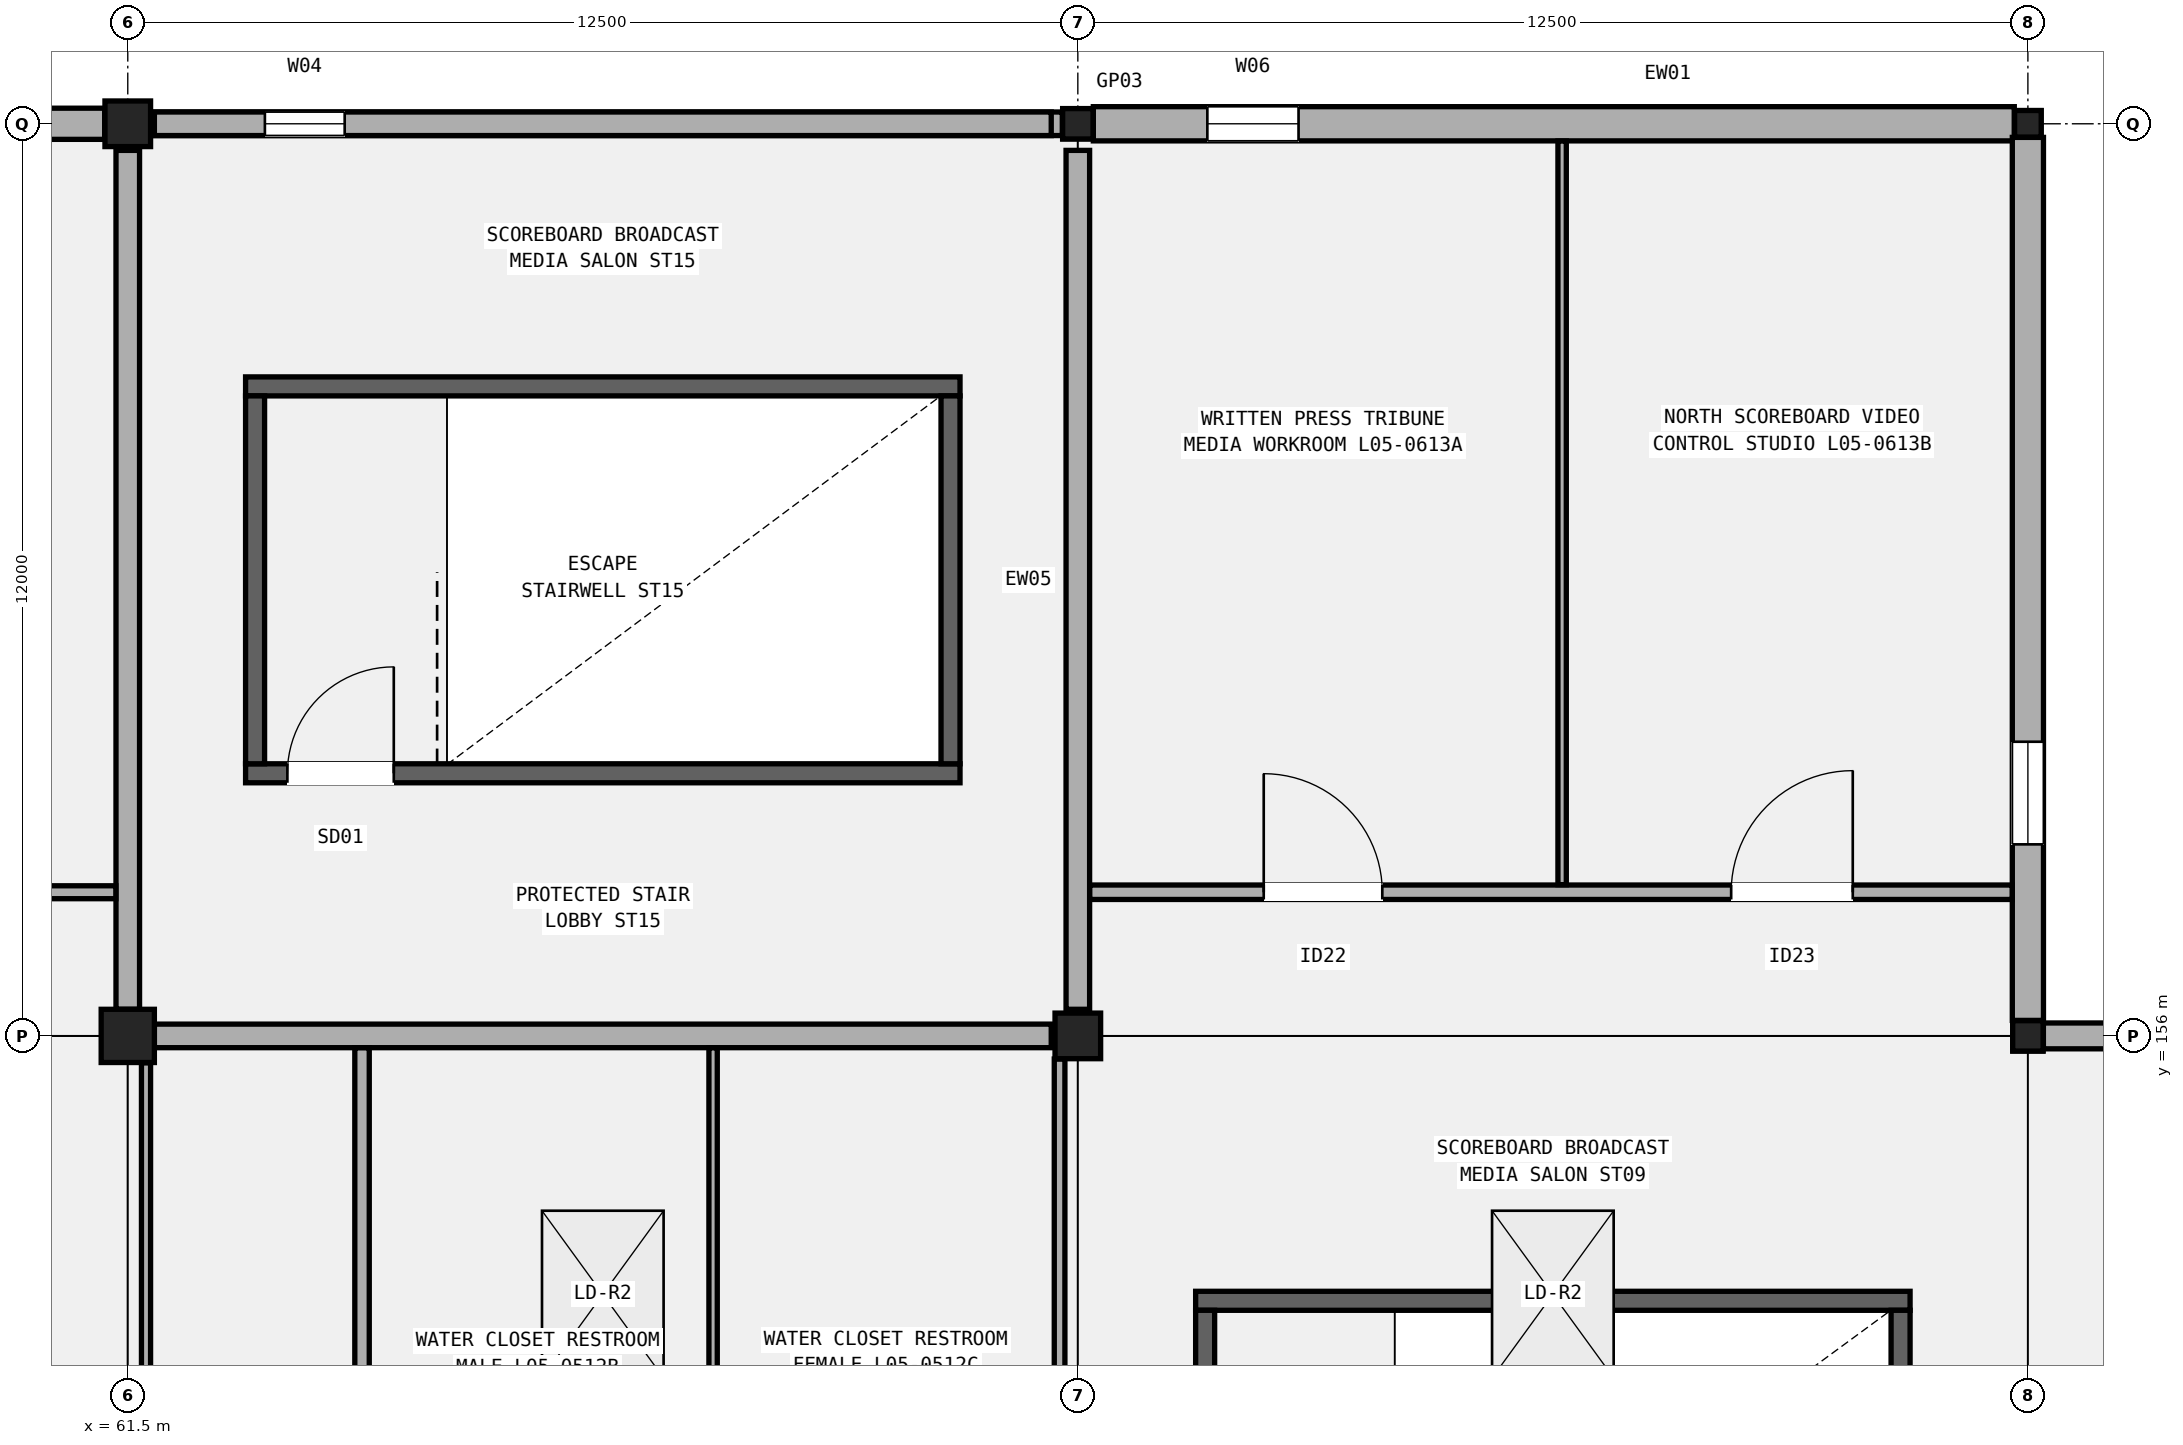
"""IFC4 building model, lengths in metres.
Left out: names, types, materials, properties, quantities, classifications, styles, units other than length and angle.
Written with IfcOpenShell. Run it as: python <this file> out.ifc"""

import sys

from ifc_helpers import new_model, si_unit, direction, frame, frame_2d, origin, origin_2d, place, context, subcontext, project, spatial, rectangle, hollow_rectangle, extrude, element, fill, save


model = new_model("IFC4")
c1 = context("Model", 3, precision=1e-05, world=origin(), true_north=direction((0.0, 1.0)))
c2 = subcontext(c1, "Body", "Model", "MODEL_VIEW")
j1 = project(units=[si_unit("LENGTHUNIT", "METRE"), si_unit("PLANEANGLEUNIT", "RADIAN")], contexts=[c1])
p1 = place(None, origin())
s1 = spatial("IfcSite", under=j1, at=p1, CompositionType="ELEMENT")
p2 = place(p1, origin())
s2 = spatial("IfcBuilding", under=s1, at=p2, CompositionType="ELEMENT")
p3 = place(p2, frame((0.0, 0.0, 25.8)))
s3 = spatial("IfcBuildingStorey", under=s2, at=p3, CompositionType="ELEMENT", Elevation=25.8)
p4 = place(p3, frame((61.5, 156.0, 0.0), z_axis=(0.0, 0.0, 1.0), x_axis=(1.0, 0.0, 0.0)))
e1 = element("IfcColumn", 1, at=p4, inside=s3, PredefinedType="COLUMN", context=c2, shape_type="SweptSolid", body=[
    extrude(rectangle(XDim=0.7, YDim=0.7, at=origin_2d()), origin(), (0.0, 0.0, 1.0), 5.4),
])
for number, where, z_axis, x_axis in (
    (2, (61.5, 168.0, 0.0), (0.0, 0.0, 1.0), (1.0, 0.0, 0.0)),
    (3, (74.0, 156.0, 0.0), (0.0, 0.0, 1.0), (1.0, 0.0, 0.0)),
):
    element("IfcColumn", number, at=place(p3, frame(where, z_axis=z_axis, x_axis=x_axis)), inside=s3, PredefinedType="COLUMN", context=c2, shape_type="SweptSolid", body=[
        extrude(rectangle(XDim=0.6, YDim=0.6, at=origin_2d()), origin(), (0.0, 0.0, 1.0), 5.4),
    ])
for number, where, z_axis, x_axis in (
    (4, (74.0, 168.0, 0.0), (0.0, 0.0, 1.0), (1.0, 0.0, 0.0)),
    (5, (86.5, 156.0, 0.0), (0.0, 0.0, 1.0), (1.0, 0.0, 0.0)),
):
    element("IfcColumn", number, at=place(p3, frame(where, z_axis=z_axis, x_axis=x_axis)), inside=s3, PredefinedType="COLUMN", context=c2, shape_type="SweptSolid", body=[
        extrude(hollow_rectangle(XDim=0.4, YDim=0.4, WallThickness=0.016, InnerFilletRadius=0.016, OuterFilletRadius=0.032, at=origin_2d()), origin(), (0.0, 0.0, 1.0), 5.4),
    ])
p5 = place(p3, frame((86.5, 168.0, 0.0), z_axis=(0.0, 0.0, 1.0), x_axis=(1.0, 0.0, 0.0)))
e6 = element("IfcColumn", 6, at=p5, inside=s3, PredefinedType="COLUMN", context=c2, shape_type="SweptSolid", body=[
    extrude(hollow_rectangle(XDim=0.35, YDim=0.35, WallThickness=0.016, InnerFilletRadius=0.016, OuterFilletRadius=0.032, at=origin_2d()), origin(), (0.0, 0.0, 1.0), 5.4),
])
p6 = place(p3, frame((49.354, 168.0, 0.0), z_axis=(0.0, 0.0, 1.0), x_axis=(1.0, 0.0, 0.0)))
e7 = element("IfcWall", 7, at=p6, inside=s3, PredefinedType="SOLIDWALL", context=c2, shape_type="SweptSolid", body=[
    extrude(rectangle(XDim=11.842, YDim=0.41, at=frame_2d((5.921, 0.0))), origin(), (0.0, 0.0, 1.0), 4.34),
])
p7 = place(p6, frame((6.039, 0.0, 0.95)))
e8 = element("IfcOpeningElement", 8, at=p7, cuts=e7, PredefinedType="OPENING", context=c2, shape_type="SweptSolid", body=[
    extrude(rectangle(XDim=0.9, YDim=2.1, at=frame_2d((0.45, 1.05))), frame((0.0, 0.215, 0.0), z_axis=(0.0, -1.0, 0.0), x_axis=(1.0, 0.0, 0.0)), (0.0, 0.0, 1.0), 0.43),
])
p8 = place(p3, frame((61.804, 168.0, 0.0), z_axis=(0.0, 0.0, 1.0), x_axis=(1.0, 0.0, 0.0)))
e9 = element("IfcWall", 9, at=p8, inside=s3, PredefinedType="SOLIDWALL", context=c2, shape_type="SweptSolid", body=[
    extrude(rectangle(XDim=11.992, YDim=0.31, at=frame_2d((5.996, 0.0))), origin(), (0.0, 0.0, 1.0), 4.44),
])
p9 = place(p8, frame((1.5, 0.0, 0.95)))
e10 = element("IfcOpeningElement", 10, at=p9, cuts=e9, PredefinedType="OPENING", context=c2, shape_type="SweptSolid", body=[
    extrude(rectangle(XDim=1.05, YDim=2.2, at=frame_2d((0.525, 1.1))), frame((0.0, 0.165, 0.0), z_axis=(0.0, -1.0, 0.0), x_axis=(1.0, 0.0, 0.0)), (0.0, 0.0, 1.0), 0.33),
])
p10 = place(p3, frame((74.204, 168.0, 0.0), z_axis=(0.0, 0.0, 1.0), x_axis=(1.0, 0.0, 0.0)))
e11 = element("IfcWall", 11, at=p10, inside=s3, PredefinedType="SOLIDWALL", context=c2, shape_type="SweptSolid", body=[
    extrude(rectangle(XDim=12.117, YDim=0.45, at=frame_2d((6.059, 0.0))), origin(), (0.0, 0.0, 1.0), 4.452),
])
p11 = place(p10, frame((1.5, 0.0, 0.95)))
e12 = element("IfcOpeningElement", 12, at=p11, cuts=e11, PredefinedType="OPENING", context=c2, shape_type="SweptSolid", body=[
    extrude(rectangle(XDim=1.2, YDim=2.3, at=frame_2d((0.6, 1.15))), frame((0.0, 0.235, 0.0), z_axis=(0.0, -1.0, 0.0), x_axis=(1.0, 0.0, 0.0)), (0.0, 0.0, 1.0), 0.47),
])
p12 = place(p3, frame((86.5, 156.204, 0.0), z_axis=(0.0, 0.0, 1.0), x_axis=(0.0, 1.0, 0.0)))
e13 = element("IfcWall", 13, at=p12, inside=s3, PredefinedType="SOLIDWALL", context=c2, shape_type="SweptSolid", body=[
    extrude(rectangle(XDim=11.617, YDim=0.41, at=frame_2d((5.809, 0.0))), origin(), (0.0, 0.0, 1.0), 4.452),
])
p13 = place(p12, frame((2.316, 0.0, 0.95)))
e14 = element("IfcOpeningElement", 14, at=p13, cuts=e13, PredefinedType="OPENING", context=c2, shape_type="SweptSolid", body=[
    extrude(rectangle(XDim=1.35, YDim=2.0, at=frame_2d((0.675, 1.0))), frame((0.0, 0.215, 0.0), z_axis=(0.0, -1.0, 0.0), x_axis=(1.0, 0.0, 0.0)), (0.0, 0.0, 1.0), 0.43),
])
p14 = place(p3, frame((86.704, 156.0, 0.0), z_axis=(0.0, 0.0, 1.0), x_axis=(1.0, 0.0, 0.0)))
e15 = element("IfcWall", 15, at=p14, inside=s3, PredefinedType="SOLIDWALL", context=c2, shape_type="SweptSolid", body=[
    extrude(rectangle(XDim=12.117, YDim=0.34, at=frame_2d((6.059, 0.0))), origin(), (0.0, 0.0, 1.0), 4.452),
])
p15 = place(p14, frame((1.5, 0.0, 0.95)))
e16 = element("IfcOpeningElement", 16, at=p15, cuts=e15, PredefinedType="OPENING", context=c2, shape_type="SweptSolid", body=[
    extrude(rectangle(XDim=1.5, YDim=1.8, at=frame_2d((0.75, 0.9))), frame((0.0, 0.18, 0.0), z_axis=(0.0, -1.0, 0.0), x_axis=(1.0, 0.0, 0.0)), (0.0, 0.0, 1.0), 0.36),
])
for number, where, z_axis, x_axis in (
    (17, (61.85, 156.0, 5.4), (0.0, 0.0, 1.0), (1.0, 0.0, 0.0)),
    (18, (61.85, 168.0, 5.4), (0.0, 0.0, 1.0), (1.0, 0.0, 0.0)),
):
    element("IfcWall", number, at=place(p3, frame(where, z_axis=z_axis, x_axis=x_axis)), inside=s3, PredefinedType="SOLIDWALL", context=c2, shape_type="SweptSolid", body=[
        extrude(rectangle(XDim=11.8, YDim=0.31, at=frame_2d((5.9, 0.0))), origin(), (0.0, 0.0, 1.0), 0.88),
    ])
for number, where, z_axis, x_axis in (
    (19, (61.5, 156.35, 5.4), (0.0, 0.0, 1.0), (0.0, 1.0, 0.0)),
    (20, (74.0, 156.35, 5.4), (0.0, 0.0, 1.0), (0.0, 1.0, 0.0)),
):
    element("IfcWall", number, at=place(p3, frame(where, z_axis=z_axis, x_axis=x_axis)), inside=s3, PredefinedType="SOLIDWALL", context=c2, shape_type="SweptSolid", body=[
        extrude(rectangle(XDim=11.3, YDim=0.31, at=frame_2d((5.65, 0.0))), origin(), (0.0, 0.0, 1.0), 0.48),
    ])
p16 = place(p3, frame((75.55, 152.515, 0.0), z_axis=(0.0, 0.0, 1.0), x_axis=(1.0, 0.0, 0.0)))
e21 = element("IfcWall", 21, at=p16, inside=s3, PredefinedType="SHEAR", context=c2, shape_type="SweptSolid", body=[
    extrude(rectangle(XDim=9.4, YDim=0.25, at=frame_2d((4.7, 0.0))), origin(), (0.0, 0.0, 1.0), 5.04),
])
for number, where, z_axis, x_axis in (
    (22, (75.675, 147.61, 0.0), (0.0, 0.0, 1.0), (0.0, 1.0, 0.0)),
    (23, (84.825, 147.61, 0.0), (0.0, 0.0, 1.0), (0.0, 1.0, 0.0)),
):
    element("IfcWall", number, at=place(p3, frame(where, z_axis=z_axis, x_axis=x_axis)), inside=s3, PredefinedType="SHEAR", context=c2, shape_type="SweptSolid", body=[
        extrude(rectangle(XDim=4.78, YDim=0.25, at=frame_2d((2.39, 0.0))), origin(), (0.0, 0.0, 1.0), 5.04),
    ])
p17 = place(p3, frame((63.05, 159.455, 0.0), z_axis=(0.0, 0.0, 1.0), x_axis=(1.0, 0.0, 0.0)))
e24 = element("IfcWall", 24, at=p17, inside=s3, PredefinedType="SHEAR", context=c2, shape_type="SweptSolid", body=[
    extrude(rectangle(XDim=9.4, YDim=0.25, at=frame_2d((4.7, 0.0))), origin(), (0.0, 0.0, 1.0), 5.04),
])
p18 = place(p17, frame((0.55, 0.0, 0.0)))
e25 = element("IfcOpeningElement", 25, at=p18, cuts=e24, PredefinedType="OPENING", context=c2, shape_type="SweptSolid", body=[
    extrude(rectangle(XDim=1.4, YDim=2.15, at=frame_2d((0.7, 1.075))), frame((0.0, 0.135, 0.0), z_axis=(0.0, -1.0, 0.0), x_axis=(1.0, 0.0, 0.0)), (0.0, 0.0, 1.0), 0.27),
])
p19 = place(p3, frame((63.05, 164.545, 0.0), z_axis=(0.0, 0.0, 1.0), x_axis=(1.0, 0.0, 0.0)))
e26 = element("IfcWall", 26, at=p19, inside=s3, PredefinedType="SHEAR", context=c2, shape_type="SweptSolid", body=[
    extrude(rectangle(XDim=9.4, YDim=0.25, at=frame_2d((4.7, 0.0))), origin(), (0.0, 0.0, 1.0), 5.04),
])
for number, where, z_axis, x_axis in (
    (27, (63.175, 159.58, 0.0), (0.0, 0.0, 1.0), (0.0, 1.0, 0.0)),
    (28, (72.325, 159.58, 0.0), (0.0, 0.0, 1.0), (0.0, 1.0, 0.0)),
):
    element("IfcWall", number, at=place(p3, frame(where, z_axis=z_axis, x_axis=x_axis)), inside=s3, PredefinedType="SHEAR", context=c2, shape_type="SweptSolid", body=[
        extrude(rectangle(XDim=4.84, YDim=0.25, at=frame_2d((2.42, 0.0))), origin(), (0.0, 0.0, 1.0), 5.04),
    ])
p20 = place(p3, frame((49.187, 157.89, 0.0), z_axis=(0.0, 0.0, 1.0), x_axis=(1.0, 0.0, 0.0)))
e29 = element("IfcWall", 29, at=p20, inside=s3, PredefinedType="PARTITIONING", context=c2, shape_type="SweptSolid", body=[
    extrude(rectangle(XDim=12.156, YDim=0.17, at=frame_2d((6.078, 0.0))), origin(), (0.0, 0.0, 1.0), 4.35),
])
p21 = place(p20, frame((2.054, 0.0, 0.0)))
e30 = element("IfcOpeningElement", 30, at=p21, cuts=e29, PredefinedType="OPENING", context=c2, shape_type="SweptSolid", body=[
    extrude(rectangle(XDim=1.36, YDim=2.25, at=frame_2d((0.68, 1.125))), frame((0.0, 0.095, 0.0), z_axis=(0.0, -1.0, 0.0), x_axis=(1.0, 0.0, 0.0)), (0.0, 0.0, 1.0), 0.19),
])
p22 = place(p20, frame((8.204, 0.0, 0.0)))
e31 = element("IfcOpeningElement", 31, at=p22, cuts=e29, PredefinedType="OPENING", context=c2, shape_type="SweptSolid", body=[
    extrude(rectangle(XDim=1.4, YDim=2.24, at=frame_2d((0.7, 1.12))), frame((0.0, 0.095, 0.0), z_axis=(0.0, -1.0, 0.0), x_axis=(1.0, 0.0, 0.0)), (0.0, 0.0, 1.0), 0.19),
])
p23 = place(p3, frame((61.74, 145.98, 0.0), z_axis=(0.0, 0.0, 1.0), x_axis=(0.0, 1.0, 0.0)))
e32 = element("IfcWall", 32, at=p23, inside=s3, PredefinedType="PARTITIONING", context=c2, shape_type="SweptSolid", body=[
    extrude(rectangle(XDim=9.666, YDim=0.12, at=frame_2d((4.833, 0.0))), origin(), (0.0, 0.0, 1.0), 4.35),
])
p24 = place(p3, frame((73.76, 145.98, 0.0), z_axis=(0.0, 0.0, 1.0), x_axis=(0.0, 1.0, 0.0)))
e33 = element("IfcWall", 33, at=p24, inside=s3, PredefinedType="PARTITIONING", context=c2, shape_type="SweptSolid", body=[
    extrude(rectangle(XDim=9.716, YDim=0.14, at=frame_2d((4.858, 0.0))), origin(), (0.0, 0.0, 1.0), 4.3),
])
p25 = place(p3, frame((64.582, 145.98, 0.0), z_axis=(0.0, 0.0, 1.0), x_axis=(0.0, 1.0, 0.0)))
e34 = element("IfcWall", 34, at=p25, inside=s3, PredefinedType="PARTITIONING", context=c2, shape_type="SweptSolid", body=[
    extrude(rectangle(XDim=9.863, YDim=0.19, at=frame_2d((4.932, 0.0))), origin(), (0.0, 0.0, 1.0), 4.35),
])
p26 = place(p3, frame((69.201, 145.98, 0.0), z_axis=(0.0, 0.0, 1.0), x_axis=(0.0, 1.0, 0.0)))
e35 = element("IfcWall", 35, at=p26, inside=s3, PredefinedType="PARTITIONING", context=c2, shape_type="SweptSolid", body=[
    extrude(rectangle(XDim=9.863, YDim=0.11, at=frame_2d((4.932, 0.0))), origin(), (0.0, 0.0, 1.0), 4.35),
])
p27 = place(p3, frame((74.157, 157.89, 0.0), z_axis=(0.0, 0.0, 1.0), x_axis=(1.0, 0.0, 0.0)))
e36 = element("IfcWall", 36, at=p27, inside=s3, PredefinedType="PARTITIONING", context=c2, shape_type="SweptSolid", body=[
    extrude(rectangle(XDim=12.136, YDim=0.19, at=frame_2d((6.068, 0.0))), origin(), (0.0, 0.0, 1.0), 4.35),
])
p28 = place(p27, frame((2.289, 0.0, 0.0)))
e37 = element("IfcOpeningElement", 37, at=p28, cuts=e36, PredefinedType="OPENING", context=c2, shape_type="SweptSolid", body=[
    extrude(rectangle(XDim=1.56, YDim=2.26, at=frame_2d((0.78, 1.13))), frame((0.0, 0.105, 0.0), z_axis=(0.0, -1.0, 0.0), x_axis=(1.0, 0.0, 0.0)), (0.0, 0.0, 1.0), 0.21),
])
p29 = place(p27, frame((8.439, 0.0, 0.0)))
e38 = element("IfcOpeningElement", 38, at=p29, cuts=e36, PredefinedType="OPENING", context=c2, shape_type="SweptSolid", body=[
    extrude(rectangle(XDim=1.6, YDim=2.3, at=frame_2d((0.8, 1.15))), frame((0.0, 0.105, 0.0), z_axis=(0.0, -1.0, 0.0), x_axis=(1.0, 0.0, 0.0)), (0.0, 0.0, 1.0), 0.21),
])
p30 = place(p3, frame((80.372, 157.99, 0.0), z_axis=(0.0, 0.0, 1.0), x_axis=(0.0, 1.0, 0.0)))
e39 = element("IfcWall", 39, at=p30, inside=s3, PredefinedType="PARTITIONING", context=c2, shape_type="SweptSolid", body=[
    extrude(rectangle(XDim=9.783, YDim=0.11, at=frame_2d((4.892, 0.0))), origin(), (0.0, 0.0, 1.0), 4.35),
])
p31 = place(p9, origin())
e40 = element("IfcWindow", 40, at=p31, inside=s3, PartitioningType="SINGLE_PANEL", PredefinedType="WINDOW", context=c2, shape_type="SweptSolid", body=[
    extrude(rectangle(XDim=1.05, YDim=2.2, at=frame_2d((0.525, 1.1))), frame((0.0, 0.03, 0.0), z_axis=(0.0, -1.0, 0.0), x_axis=(1.0, 0.0, 0.0)), (0.0, 0.0, 1.0), 0.06),
])
fill(e10, e40)
p32 = place(p11, origin())
e41 = element("IfcWindow", 41, at=p32, inside=s3, PartitioningType="SINGLE_PANEL", PredefinedType="WINDOW", context=c2, shape_type="SweptSolid", body=[
    extrude(rectangle(XDim=1.2, YDim=2.3, at=frame_2d((0.6, 1.15))), frame((0.0, 0.03, 0.0), z_axis=(0.0, -1.0, 0.0), x_axis=(1.0, 0.0, 0.0)), (0.0, 0.0, 1.0), 0.06),
])
fill(e12, e41)
p33 = place(p13, origin())
e42 = element("IfcWindow", 42, at=p33, inside=s3, PartitioningType="SINGLE_PANEL", PredefinedType="WINDOW", context=c2, shape_type="SweptSolid", body=[
    extrude(rectangle(XDim=1.35, YDim=2.0, at=frame_2d((0.675, 1.0))), frame((0.0, 0.03, 0.0), z_axis=(0.0, -1.0, 0.0), x_axis=(1.0, 0.0, 0.0)), (0.0, 0.0, 1.0), 0.06),
])
fill(e14, e42)
p34 = place(p2, frame((0.0, 0.0, 31.2)))
p35 = place(p34, frame((0.0, 0.0, -0.36)))
p36 = place(p35, frame((67.75, 152.6, 0.0)))
p37 = place(p36, frame((0.0, 0.0, 0.31)))
e43 = element("IfcWindow", 43, at=p37, inside=s3, PartitioningType="SINGLE_PANEL", PredefinedType="LIGHTDOME", context=c2, shape_type="SweptSolid", body=[
    extrude(rectangle(XDim=2.2, YDim=1.6, at=origin_2d()), origin(), (0.0, 0.0, 1.0), 0.05),
])
p38 = place(p34, frame((0.0, 0.0, -0.36)))
p39 = place(p38, frame((80.25, 152.6, 0.0)))
p40 = place(p39, frame((0.0, 0.0, 0.31)))
e44 = element("IfcWindow", 44, at=p40, inside=s3, PartitioningType="SINGLE_PANEL", PredefinedType="LIGHTDOME", context=c2, shape_type="SweptSolid", body=[
    extrude(rectangle(XDim=2.2, YDim=1.6, at=origin_2d()), origin(), (0.0, 0.0, 1.0), 0.05),
])
p41 = place(p18, origin())
e45 = element("IfcDoor", 45, at=p41, inside=s3, OperationType="SINGLE_SWING_RIGHT", PredefinedType="DOOR", context=c2, shape_type="SweptSolid", body=[
    extrude(rectangle(XDim=1.4, YDim=2.15, at=frame_2d((0.7, 1.075))), frame((0.0, 0.025, 0.0), z_axis=(0.0, -1.0, 0.0), x_axis=(1.0, 0.0, 0.0)), (0.0, 0.0, 1.0), 0.05),
])
fill(e25, e45)
p42 = place(p28, origin())
e46 = element("IfcDoor", 46, at=p42, inside=s3, OperationType="SINGLE_SWING_LEFT", PredefinedType="DOOR", context=c2, shape_type="SweptSolid", body=[
    extrude(rectangle(XDim=1.56, YDim=2.26, at=frame_2d((0.78, 1.13))), frame((0.0, 0.025, 0.0), z_axis=(0.0, -1.0, 0.0), x_axis=(1.0, 0.0, 0.0)), (0.0, 0.0, 1.0), 0.05),
])
fill(e37, e46)
p43 = place(p29, origin())
e47 = element("IfcDoor", 47, at=p43, inside=s3, OperationType="SINGLE_SWING_RIGHT", PredefinedType="DOOR", context=c2, shape_type="SweptSolid", body=[
    extrude(rectangle(XDim=1.6, YDim=2.3, at=frame_2d((0.8, 1.15))), frame((0.0, 0.025, 0.0), z_axis=(0.0, -1.0, 0.0), x_axis=(1.0, 0.0, 0.0)), (0.0, 0.0, 1.0), 0.05),
])
fill(e38, e47)
save(model, sys.argv[1])
